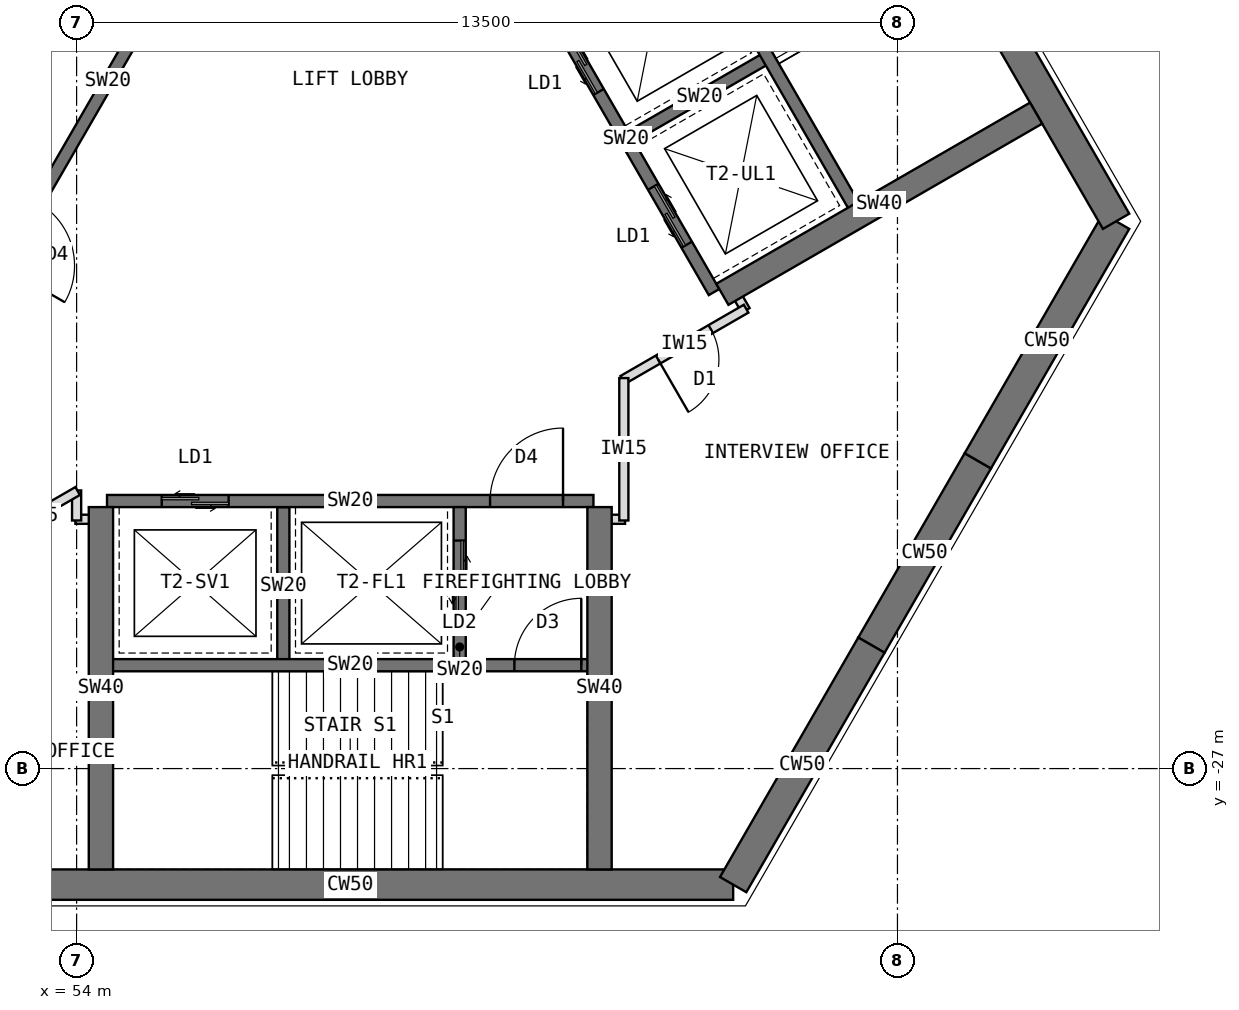
"""IFC4 building model, lengths in metres.
Left out: names, types, materials, properties, quantities, classifications, styles, units other than length and angle.
Written with IfcOpenShell. Run it as: python <this file> out.ifc"""

import sys

from ifc_helpers import new_model, si_unit, direction, frame, frame_2d, origin, place, context, subcontext, project, spatial, rectangle, extrude, element, fill, save


model = new_model("IFC4")
c1 = context("Model", 3, precision=1e-05, world=origin(), true_north=direction((0.0, 1.0)))
c2 = subcontext(c1, "Body", "Model", "MODEL_VIEW")
j1 = project(units=[si_unit("LENGTHUNIT", "METRE"), si_unit("PLANEANGLEUNIT", "RADIAN")], contexts=[c1])
p1 = place(None, origin())
s1 = spatial("IfcSite", under=j1, at=p1, CompositionType="ELEMENT")
p2 = place(p1, origin())
s2 = spatial("IfcBuilding", under=s1, at=p2, CompositionType="ELEMENT")
p3 = place(p2, frame((0.0, 0.0, 218.5)))
s3 = spatial("IfcBuildingStorey", under=s2, at=p3, CompositionType="ELEMENT", Elevation=218.5)
p4 = place(p3, frame((52.202, -28.908, 0.0), z_axis=(0.0, 0.0, 1.0), x_axis=(1.0, 0.0, 0.0)))
e1 = element("IfcWall", 1, at=p4, inside=s3, PredefinedType="SHEAR", context=c2, shape_type="SweptSolid", body=[
    extrude(rectangle(XDim=12.596, YDim=0.5, at=frame_2d((6.298, 0.0))), origin(), (0.0, 0.0, 1.0), 4.0),
])
p5 = place(p3, frame((64.798, -28.908, 0.0), z_axis=(0.0, 0.0, 1.0), x_axis=(0.499984222037, 0.866034513004, 0.0)))
e2 = element("IfcWall", 2, at=p5, inside=s3, PredefinedType="SHEAR", context=c2, shape_type="SweptSolid", body=[
    extrude(rectangle(XDim=4.548, YDim=0.5, at=frame_2d((2.274, 0.0))), origin(), (0.0, 0.0, 1.0), 4.0),
])
p6 = place(p3, frame((67.072, -24.97, 0.0), z_axis=(0.0, 0.0, 1.0), x_axis=(0.500010275428, 0.866019471182, 0.0)))
e3 = element("IfcWall", 3, at=p6, inside=s3, PredefinedType="SHEAR", context=c2, shape_type="SweptSolid", body=[
    extrude(rectangle(XDim=3.5, YDim=0.5, at=frame_2d((1.75, 0.0))), origin(), (0.0, 0.0, 1.0), 4.0),
])
p7 = place(p3, frame((68.822, -21.939, 0.0), z_axis=(0.0, 0.0, 1.0), x_axis=(0.500024481964, 0.866011268655, 0.0)))
e4 = element("IfcWall", 4, at=p7, inside=s3, PredefinedType="SHEAR", context=c2, shape_type="SweptSolid", body=[
    extrude(rectangle(XDim=4.548, YDim=0.5, at=frame_2d((2.274, 0.0))), origin(), (0.0, 0.0, 1.0), 4.0),
])
p8 = place(p3, frame((71.096, -18.0, 0.0), z_axis=(0.0, 0.0, 1.0), x_axis=(-0.500005998175, 0.866021940709, 0.0)))
e5 = element("IfcWall", 5, at=p8, inside=s3, PredefinedType="SHEAR", context=c2, shape_type="SweptSolid", body=[
    extrude(rectangle(XDim=12.596, YDim=0.5, at=frame_2d((6.298, 0.0))), origin(), (0.0, 0.0, 1.0), 4.0),
])
p9 = place(p3, frame((56.516, -12.236, 0.0), z_axis=(0.0, 0.0, 1.0), x_axis=(-0.49999894854, -0.866026010844, 0.0)))
e6 = element("IfcWall", 6, at=p9, inside=s3, PredefinedType="SHEAR", context=c2, shape_type="SweptSolid", body=[
    extrude(rectangle(XDim=8.0, YDim=0.2, at=frame_2d((4.0, 0.0))), origin(), (0.0, 0.0, 1.0), 4.0),
])
p10 = place(p9, frame((6.3, 0.0, 0.0)))
e7 = element("IfcOpeningElement", 7, at=p10, cuts=e6, PredefinedType="OPENING", context=c2, shape_type="SweptSolid", body=[
    extrude(rectangle(XDim=1.2, YDim=2.1, at=frame_2d((0.6, 1.05))), frame((0.0, 0.11, 0.0), z_axis=(0.0, -1.0, 0.0), x_axis=(1.0, 0.0, 0.0)), (0.0, 0.0, 1.0), 0.22),
])
p11 = place(p3, frame((54.178, -10.886, 0.0), z_axis=(0.0, 0.0, 1.0), x_axis=(-0.49999894854, -0.866026010844, 0.0)))
e8 = element("IfcWall", 8, at=p11, inside=s3, PredefinedType="SHEAR", context=c2, shape_type="SweptSolid", body=[
    extrude(rectangle(XDim=8.0, YDim=0.2, at=frame_2d((4.0, 0.0))), origin(), (0.0, 0.0, 1.0), 4.0),
])
p12 = place(p11, frame((6.8, 0.0, 0.0)))
e9 = element("IfcOpeningElement", 9, at=p12, cuts=e8, PredefinedType="OPENING", context=c2, shape_type="SweptSolid", body=[
    extrude(rectangle(XDim=0.9, YDim=2.1, at=frame_2d((0.45, 1.05))), frame((0.0, 0.11, 0.0), z_axis=(0.0, -1.0, 0.0), x_axis=(1.0, 0.0, 0.0)), (0.0, 0.0, 1.0), 0.22),
])
p13 = place(p3, frame((54.5, -22.6, 0.0), z_axis=(0.0, 0.0, 1.0), x_axis=(1.0, 0.0, 0.0)))
e10 = element("IfcWall", 10, at=p13, inside=s3, PredefinedType="SHEAR", context=c2, shape_type="SweptSolid", body=[
    extrude(rectangle(XDim=8.0, YDim=0.2, at=frame_2d((4.0, 0.0))), origin(), (0.0, 0.0, 1.0), 4.0),
])
p14 = place(p13, frame((6.3, 0.0, 0.0)))
e11 = element("IfcOpeningElement", 11, at=p14, cuts=e10, PredefinedType="OPENING", context=c2, shape_type="SweptSolid", body=[
    extrude(rectangle(XDim=1.2, YDim=2.1, at=frame_2d((0.6, 1.05))), frame((0.0, 0.11, 0.0), z_axis=(0.0, -1.0, 0.0), x_axis=(1.0, 0.0, 0.0)), (0.0, 0.0, 1.0), 0.22),
])
p15 = place(p13, frame((0.9, 0.0, 0.0)))
e12 = element("IfcOpeningElement", 12, at=p15, cuts=e10, PredefinedType="OPENING", context=c2, shape_type="SweptSolid", body=[
    extrude(rectangle(XDim=1.1, YDim=2.2, at=frame_2d((0.55, 1.1))), frame((0.0, 0.11, 0.0), z_axis=(0.0, -1.0, 0.0), x_axis=(1.0, 0.0, 0.0)), (0.0, 0.0, 1.0), 0.22),
])
p16 = place(p3, frame((57.4, -22.7, 0.0), z_axis=(0.0, 0.0, 1.0), x_axis=(0.0, -1.0, 0.0)))
e13 = element("IfcWall", 13, at=p16, inside=s3, PredefinedType="SHEAR", context=c2, shape_type="SweptSolid", body=[
    extrude(rectangle(XDim=2.6, YDim=0.2, at=frame_2d((1.3, 0.0))), origin(), (0.0, 0.0, 1.0), 4.0),
])
p17 = place(p3, frame((60.3, -22.7, 0.0), z_axis=(0.0, 0.0, 1.0), x_axis=(0.0, -1.0, 0.0)))
e14 = element("IfcWall", 14, at=p17, inside=s3, PredefinedType="SHEAR", context=c2, shape_type="SweptSolid", body=[
    extrude(rectangle(XDim=2.6, YDim=0.2, at=frame_2d((1.3, 0.0))), origin(), (0.0, 0.0, 1.0), 4.0),
])
p18 = place(p17, frame((0.55, 0.0, 0.0)))
e15 = element("IfcOpeningElement", 15, at=p18, cuts=e14, PredefinedType="OPENING", context=c2, shape_type="SweptSolid", body=[
    extrude(rectangle(XDim=1.3, YDim=2.2, at=frame_2d((0.65, 1.1))), frame((0.0, 0.11, 0.0), z_axis=(0.0, -1.0, 0.0), x_axis=(1.0, 0.0, 0.0)), (0.0, 0.0, 1.0), 0.22),
])
p19 = place(p3, frame((54.5, -25.3, 0.0), z_axis=(0.0, 0.0, 1.0), x_axis=(1.0, 0.0, 0.0)))
e16 = element("IfcWall", 16, at=p19, inside=s3, PredefinedType="SHEAR", context=c2, shape_type="SweptSolid", body=[
    extrude(rectangle(XDim=8.0, YDim=0.2, at=frame_2d((4.0, 0.0))), origin(), (0.0, 0.0, 1.0), 4.0),
])
p20 = place(p19, frame((6.7, 0.0, 0.0)))
e17 = element("IfcOpeningElement", 17, at=p20, cuts=e16, PredefinedType="OPENING", context=c2, shape_type="SweptSolid", body=[
    extrude(rectangle(XDim=1.1, YDim=2.1, at=frame_2d((0.55, 1.05))), frame((0.0, 0.11, 0.0), z_axis=(0.0, -1.0, 0.0), x_axis=(1.0, 0.0, 0.0)), (0.0, 0.0, 1.0), 0.22),
])
for number, where, z_axis, x_axis in (
    (18, (62.6, -22.7, 0.0), (0.0, 0.0, 1.0), (0.0, -1.0, 0.0)),
    (19, (54.4, -22.7, 0.0), (0.0, 0.0, 1.0), (0.0, -1.0, 0.0)),
):
    element("IfcWall", number, at=place(p3, frame(where, z_axis=z_axis, x_axis=x_axis)), inside=s3, PredefinedType="SHEAR", context=c2, shape_type="SweptSolid", body=[
        extrude(rectangle(XDim=5.958, YDim=0.4, at=frame_2d((2.979, 0.0))), origin(), (0.0, 0.0, 1.0), 4.0),
    ])
p21 = place(p3, frame((64.484, -19.164, 0.0), z_axis=(0.0, 0.0, 1.0), x_axis=(-0.49999894854, 0.866026010844, 0.0)))
e20 = element("IfcWall", 20, at=p21, inside=s3, PredefinedType="SHEAR", context=c2, shape_type="SweptSolid", body=[
    extrude(rectangle(XDim=8.0, YDim=0.2, at=frame_2d((4.0, 0.0))), origin(), (0.0, 0.0, 1.0), 4.0),
])
p22 = place(p21, frame((6.3, 0.0, 0.0)))
e21 = element("IfcOpeningElement", 21, at=p22, cuts=e20, PredefinedType="OPENING", context=c2, shape_type="SweptSolid", body=[
    extrude(rectangle(XDim=1.2, YDim=2.1, at=frame_2d((0.6, 1.05))), frame((0.0, 0.11, 0.0), z_axis=(0.0, -1.0, 0.0), x_axis=(1.0, 0.0, 0.0)), (0.0, 0.0, 1.0), 0.22),
])
p23 = place(p21, frame((0.9, 0.0, 0.0)))
e22 = element("IfcOpeningElement", 22, at=p23, cuts=e20, PredefinedType="OPENING", context=c2, shape_type="SweptSolid", body=[
    extrude(rectangle(XDim=1.1, YDim=2.2, at=frame_2d((0.55, 1.1))), frame((0.0, 0.11, 0.0), z_axis=(0.0, -1.0, 0.0), x_axis=(1.0, 0.0, 0.0)), (0.0, 0.0, 1.0), 0.22),
])
p24 = place(p21, frame((3.8, 0.0, 0.0)))
e23 = element("IfcOpeningElement", 23, at=p24, cuts=e20, PredefinedType="OPENING", context=c2, shape_type="SweptSolid", body=[
    extrude(rectangle(XDim=1.1, YDim=2.2, at=frame_2d((0.55, 1.1))), frame((0.0, 0.11, 0.0), z_axis=(0.0, -1.0, 0.0), x_axis=(1.0, 0.0, 0.0)), (0.0, 0.0, 1.0), 0.22),
])
p25 = place(p3, frame((63.12, -16.603, 0.0), z_axis=(0.0, 0.0, 1.0), x_axis=(0.866062058628, 0.499936506574, 0.0)))
e24 = element("IfcWall", 24, at=p25, inside=s3, PredefinedType="SHEAR", context=c2, shape_type="SweptSolid", body=[
    extrude(rectangle(XDim=2.6, YDim=0.2, at=frame_2d((1.3, 0.0))), origin(), (0.0, 0.0, 1.0), 4.0),
])
p26 = place(p3, frame((66.822, -17.814, 0.0), z_axis=(0.0, 0.0, 1.0), x_axis=(-0.49999894854, 0.866026010844, 0.0)))
e25 = element("IfcWall", 25, at=p26, inside=s3, PredefinedType="SHEAR", context=c2, shape_type="SweptSolid", body=[
    extrude(rectangle(XDim=8.0, YDim=0.2, at=frame_2d((4.0, 0.0))), origin(), (0.0, 0.0, 1.0), 4.0),
])
p27 = place(p26, frame((6.7, 0.0, 0.0)))
e26 = element("IfcOpeningElement", 26, at=p27, cuts=e25, PredefinedType="OPENING", context=c2, shape_type="SweptSolid", body=[
    extrude(rectangle(XDim=1.1, YDim=2.1, at=frame_2d((0.55, 1.05))), frame((0.0, 0.11, 0.0), z_axis=(0.0, -1.0, 0.0), x_axis=(1.0, 0.0, 0.0)), (0.0, 0.0, 1.0), 0.22),
])
p28 = place(p3, frame((64.62, -19.201, 0.0), z_axis=(0.0, 0.0, 1.0), x_axis=(0.866012946976, 0.500021575205, 0.0)))
e27 = element("IfcWall", 27, at=p28, inside=s3, PredefinedType="SHEAR", context=c2, shape_type="SweptSolid", body=[
    extrude(rectangle(XDim=5.958, YDim=0.4, at=frame_2d((2.979, 0.0))), origin(), (0.0, 0.0, 1.0), 4.0),
])
for number, where, z_axis, x_axis in (
    (28, (63.02, -22.9, 0.0), (0.0, 0.0, 1.0), (-1.0, 0.0, 0.0)),
    (29, (54.41, -22.9, 0.0), (0.0, 0.0, 1.0), (-1.0, 0.0, 0.0)),
):
    element("IfcWall", number, at=place(p3, frame(where, z_axis=z_axis, x_axis=x_axis)), inside=s3, PredefinedType="PARTITIONING", context=c2, shape_type="SweptSolid", body=[
        extrude(rectangle(XDim=0.43, YDim=0.15, at=frame_2d((0.215, 0.0))), origin(), (0.0, 0.0, 1.0), 3.8),
    ])
p29 = place(p3, frame((54.0, -22.92, 0.0), z_axis=(0.0, 0.0, 1.0), x_axis=(0.0, 1.0, 0.0)))
e30 = element("IfcWall", 30, at=p29, inside=s3, PredefinedType="PARTITIONING", context=c2, shape_type="SweptSolid", body=[
    extrude(rectangle(XDim=0.494, YDim=0.15, at=frame_2d((0.247, 0.0))), origin(), (0.0, 0.0, 1.0), 3.8),
])
p30 = place(p3, frame((54.017, -22.436, 0.0), z_axis=(0.0, 0.0, 1.0), x_axis=(-0.866024503882, -0.500001558674, 0.0)))
e31 = element("IfcWall", 31, at=p30, inside=s3, PredefinedType="PARTITIONING", context=c2, shape_type="SweptSolid", body=[
    extrude(rectangle(XDim=4.568, YDim=0.15, at=frame_2d((2.284, 0.0))), origin(), (0.0, 0.0, 1.0), 3.8),
])
p31 = place(p30, frame((1.794, 0.0, 0.0)))
e32 = element("IfcOpeningElement", 32, at=p31, cuts=e31, PredefinedType="OPENING", context=c2, shape_type="SweptSolid", body=[
    extrude(rectangle(XDim=1.0, YDim=2.1, at=frame_2d((0.5, 1.05))), frame((0.0, 0.085, 0.0), z_axis=(0.0, -1.0, 0.0), x_axis=(1.0, 0.0, 0.0)), (0.0, 0.0, 1.0), 0.17),
])
p32 = place(p3, frame((64.789, -19.092, 0.0), z_axis=(0.0, 0.0, 1.0), x_axis=(0.499804398801, -0.866138304741, 0.0)))
e33 = element("IfcWall", 33, at=p32, inside=s3, PredefinedType="PARTITIONING", context=c2, shape_type="SweptSolid", body=[
    extrude(rectangle(XDim=0.43, YDim=0.15, at=frame_2d((0.215, 0.0))), origin(), (0.0, 0.0, 1.0), 3.8),
])
p33 = place(p3, frame((65.011, -19.437, 0.0), z_axis=(0.0, 0.0, 1.0), x_axis=(-0.865982457891, -0.500074377092, 0.0)))
e34 = element("IfcWall", 34, at=p33, inside=s3, PredefinedType="PARTITIONING", context=c2, shape_type="SweptSolid", body=[
    extrude(rectangle(XDim=2.342, YDim=0.15, at=frame_2d((1.171, 0.0))), origin(), (0.0, 0.0, 1.0), 3.8),
])
p34 = place(p33, frame((0.671, 0.0, 0.0)))
e35 = element("IfcOpeningElement", 35, at=p34, cuts=e34, PredefinedType="OPENING", context=c2, shape_type="SweptSolid", body=[
    extrude(rectangle(XDim=1.0, YDim=2.1, at=frame_2d((0.5, 1.05))), frame((0.0, 0.085, 0.0), z_axis=(0.0, -1.0, 0.0), x_axis=(1.0, 0.0, 0.0)), (0.0, 0.0, 1.0), 0.17),
])
p35 = place(p3, frame((63.0, -20.578, 0.0), z_axis=(0.0, 0.0, 1.0), x_axis=(0.0, -1.0, 0.0)))
e36 = element("IfcWall", 36, at=p35, inside=s3, PredefinedType="PARTITIONING", context=c2, shape_type="SweptSolid", body=[
    extrude(rectangle(XDim=2.342, YDim=0.15, at=frame_2d((1.171, 0.0))), origin(), (0.0, 0.0, 1.0), 3.8),
])
p36 = place(p14, origin())
e37 = element("IfcDoor", 37, at=p36, inside=s3, OperationType="SINGLE_SWING_RIGHT", PredefinedType="DOOR", context=c2, shape_type="SweptSolid", body=[
    extrude(rectangle(XDim=1.2, YDim=2.1, at=frame_2d((0.6, 1.05))), frame((0.0, 0.025, 0.0), z_axis=(0.0, -1.0, 0.0), x_axis=(1.0, 0.0, 0.0)), (0.0, 0.0, 1.0), 0.05),
])
fill(e11, e37)
p37 = place(p18, origin())
e38 = element("IfcDoor", 38, at=p37, inside=s3, OperationType="DOUBLE_DOOR_SLIDING", PredefinedType="DOOR", context=c2, shape_type="SweptSolid", body=[
    extrude(rectangle(XDim=1.3, YDim=2.2, at=frame_2d((0.65, 1.1))), frame((0.0, 0.025, 0.0), z_axis=(0.0, -1.0, 0.0), x_axis=(1.0, 0.0, 0.0)), (0.0, 0.0, 1.0), 0.05),
])
fill(e15, e38)
p38 = place(p15, origin())
e39 = element("IfcDoor", 39, at=p38, inside=s3, OperationType="DOUBLE_DOOR_SLIDING", PredefinedType="DOOR", context=c2, shape_type="SweptSolid", body=[
    extrude(rectangle(XDim=1.1, YDim=2.2, at=frame_2d((0.55, 1.1))), frame((0.0, 0.025, 0.0), z_axis=(0.0, -1.0, 0.0), x_axis=(1.0, 0.0, 0.0)), (0.0, 0.0, 1.0), 0.05),
])
fill(e12, e39)
p39 = place(p20, origin())
e40 = element("IfcDoor", 40, at=p39, inside=s3, OperationType="SINGLE_SWING_RIGHT", PredefinedType="DOOR", context=c2, shape_type="SweptSolid", body=[
    extrude(rectangle(XDim=1.1, YDim=2.1, at=frame_2d((0.55, 1.05))), frame((0.0, 0.025, 0.0), z_axis=(0.0, -1.0, 0.0), x_axis=(1.0, 0.0, 0.0)), (0.0, 0.0, 1.0), 0.05),
])
fill(e17, e40)
p40 = place(p23, origin())
e41 = element("IfcDoor", 41, at=p40, inside=s3, OperationType="DOUBLE_DOOR_SLIDING", PredefinedType="DOOR", context=c2, shape_type="SweptSolid", body=[
    extrude(rectangle(XDim=1.1, YDim=2.2, at=frame_2d((0.55, 1.1))), frame((0.0, 0.025, 0.0), z_axis=(0.0, -1.0, 0.0), x_axis=(1.0, 0.0, 0.0)), (0.0, 0.0, 1.0), 0.05),
])
fill(e22, e41)
p41 = place(p24, origin())
e42 = element("IfcDoor", 42, at=p41, inside=s3, OperationType="DOUBLE_DOOR_SLIDING", PredefinedType="DOOR", context=c2, shape_type="SweptSolid", body=[
    extrude(rectangle(XDim=1.1, YDim=2.2, at=frame_2d((0.55, 1.1))), frame((0.0, 0.025, 0.0), z_axis=(0.0, -1.0, 0.0), x_axis=(1.0, 0.0, 0.0)), (0.0, 0.0, 1.0), 0.05),
])
fill(e23, e42)
p42 = place(p34, origin())
e43 = element("IfcDoor", 43, at=p42, inside=s3, OperationType="SINGLE_SWING_RIGHT", PredefinedType="DOOR", context=c2, shape_type="SweptSolid", body=[
    extrude(rectangle(XDim=1.0, YDim=2.1, at=frame_2d((0.5, 1.05))), frame((0.0, 0.025, 0.0), z_axis=(0.0, -1.0, 0.0), x_axis=(1.0, 0.0, 0.0)), (0.0, 0.0, 1.0), 0.05),
])
fill(e35, e43)
save(model, sys.argv[1])
